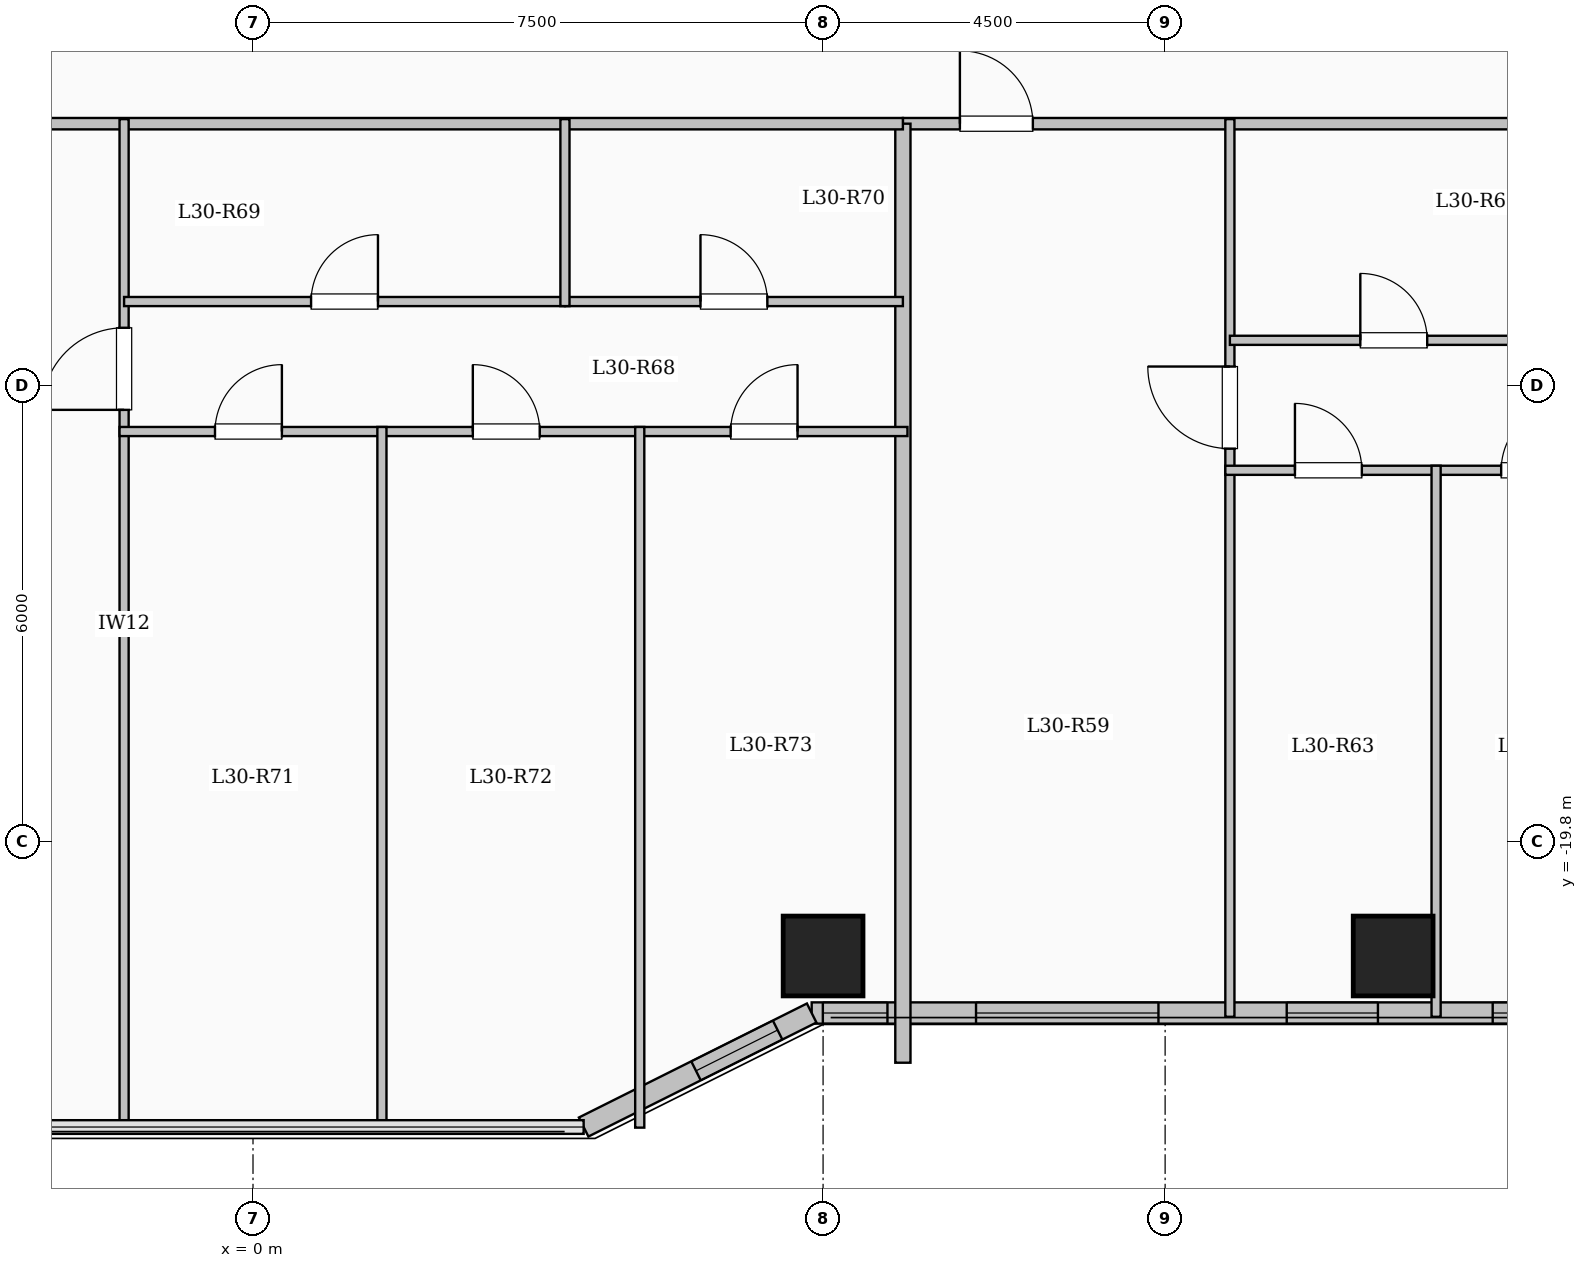
"""IFC4 building model, lengths in metres.
Left out: names, types, materials, properties, quantities, classifications, styles, units other than length and angle.
Written with IfcOpenShell. Run it as: python <this file> out.ifc"""

import sys

from ifc_helpers import new_model, si_unit, direction, frame, frame_2d, origin, origin_2d, place, context, subcontext, project, spatial, rectangle, extrude, element, fill, save


model = new_model("IFC4")
c1 = context("Model", 3, precision=1e-05, world=origin(), true_north=direction((0.0, 1.0)))
c2 = subcontext(c1, "Body", "Model", "MODEL_VIEW")
j1 = project(units=[si_unit("LENGTHUNIT", "METRE"), si_unit("PLANEANGLEUNIT", "RADIAN")], contexts=[c1])
p1 = place(None, origin())
s1 = spatial("IfcSite", under=j1, at=p1, CompositionType="ELEMENT")
p2 = place(p1, origin())
s2 = spatial("IfcBuilding", under=s1, at=p2, CompositionType="ELEMENT")
p3 = place(p2, frame((0.0, 0.0, 111.8)))
s3 = spatial("IfcBuildingStorey", under=s2, at=p3, CompositionType="ELEMENT", Elevation=111.8)
for number, where, z_axis, x_axis in (
    (1, (7.5, -21.3, 0.0), (0.0, 0.0, 1.0), (1.0, 0.0, 0.0)),
    (2, (15.0, -21.3, 0.0), (0.0, 0.0, 1.0), (1.0, 0.0, 0.0)),
):
    element("IfcColumn", number, at=place(p3, frame(where, z_axis=z_axis, x_axis=x_axis)), inside=s3, PredefinedType="COLUMN", context=c2, shape_type="SweptSolid", body=[
        extrude(rectangle(XDim=1.05, YDim=1.05, at=origin_2d()), origin(), (0.0, 0.0, 1.0), 3.35),
    ])
p4 = place(p3, frame((21.15, -22.05, 0.0), z_axis=(0.0, 0.0, 1.0), x_axis=(-1.0, 0.0, 0.0)))
e3 = element("IfcWall", 3, at=p4, inside=s3, PredefinedType="SOLIDWALL", context=c2, shape_type="SweptSolid", body=[
    extrude(rectangle(XDim=13.8, YDim=0.28, at=frame_2d((6.9, 0.0))), origin(), (0.0, 0.0, 1.0), 3.1),
])
p5 = place(p4, frame((0.88, 0.0, 0.95)))
e4 = element("IfcOpeningElement", 4, at=p5, cuts=e3, PredefinedType="OPENING", context=c2, shape_type="SweptSolid", body=[
    extrude(rectangle(XDim=1.2, YDim=1.5, at=frame_2d((0.6, 0.75))), frame((0.0, 0.15, 0.0), z_axis=(0.0, -1.0, 0.0), x_axis=(1.0, 0.0, 0.0)), (0.0, 0.0, 1.0), 0.3),
])
p6 = place(p4, frame((3.64, 0.0, 0.95)))
e5 = element("IfcOpeningElement", 5, at=p6, cuts=e3, PredefinedType="OPENING", context=c2, shape_type="SweptSolid", body=[
    extrude(rectangle(XDim=1.2, YDim=1.5, at=frame_2d((0.6, 0.75))), frame((0.0, 0.15, 0.0), z_axis=(0.0, -1.0, 0.0), x_axis=(1.0, 0.0, 0.0)), (0.0, 0.0, 1.0), 0.3),
])
p7 = place(p4, frame((6.35, 0.0, 0.95)))
e6 = element("IfcOpeningElement", 6, at=p7, cuts=e3, PredefinedType="OPENING", context=c2, shape_type="SweptSolid", body=[
    extrude(rectangle(XDim=1.2, YDim=1.5, at=frame_2d((0.6, 0.75))), frame((0.0, 0.15, 0.0), z_axis=(0.0, -1.0, 0.0), x_axis=(1.0, 0.0, 0.0)), (0.0, 0.0, 1.0), 0.3),
])
p8 = place(p4, frame((9.238, 0.0, 0.9)))
e7 = element("IfcOpeningElement", 7, at=p8, cuts=e3, PredefinedType="OPENING", context=c2, shape_type="SweptSolid", body=[
    extrude(rectangle(XDim=2.4, YDim=1.8, at=frame_2d((1.2, 0.9))), frame((0.0, 0.15, 0.0), z_axis=(0.0, -1.0, 0.0), x_axis=(1.0, 0.0, 0.0)), (0.0, 0.0, 1.0), 0.3),
])
p9 = place(p4, frame((12.803, 0.0, 0.95)))
e8 = element("IfcOpeningElement", 8, at=p9, cuts=e3, PredefinedType="OPENING", context=c2, shape_type="SweptSolid", body=[
    extrude(rectangle(XDim=0.85, YDim=1.5, at=frame_2d((0.425, 0.75))), frame((0.0, 0.15, 0.0), z_axis=(0.0, -1.0, 0.0), x_axis=(1.0, 0.0, 0.0)), (0.0, 0.0, 1.0), 0.3),
])
p10 = place(p3, frame((7.35, -22.05, 0.0), z_axis=(0.0, 0.0, 1.0), x_axis=(-0.894427191, -0.4472135955, 0.0)))
e9 = element("IfcWall", 9, at=p10, inside=s3, PredefinedType="SOLIDWALL", context=c2, shape_type="SweptSolid", body=[
    extrude(rectangle(XDim=3.354, YDim=0.28, at=frame_2d((1.677, 0.0))), origin(), (0.0, 0.0, 1.0), 3.1),
])
p11 = place(p10, frame((0.501, 0.0, 0.95)))
e10 = element("IfcOpeningElement", 10, at=p11, cuts=e9, PredefinedType="OPENING", context=c2, shape_type="SweptSolid", body=[
    extrude(rectangle(XDim=1.2, YDim=1.5, at=frame_2d((0.6, 0.75))), frame((0.0, 0.15, 0.0), z_axis=(0.0, -1.0, 0.0), x_axis=(1.0, 0.0, 0.0)), (0.0, 0.0, 1.0), 0.3),
])
p12 = place(p3, frame((8.55, -10.35, 0.0), z_axis=(0.0, 0.0, 1.0), x_axis=(1.0, 0.0, 0.0)))
e11 = element("IfcWall", 11, at=p12, inside=s3, PredefinedType="PARTITIONING", context=c2, shape_type="SweptSolid", body=[
    extrude(rectangle(XDim=12.5, YDim=0.15, at=frame_2d((6.25, 0.0))), origin(), (0.0, 0.0, 1.0), 3.1),
])
p13 = place(p12, frame((0.75, 0.0, 0.0)))
e12 = element("IfcOpeningElement", 12, at=p13, cuts=e11, PredefinedType="OPENING", context=c2, shape_type="SweptSolid", body=[
    extrude(rectangle(XDim=0.96, YDim=2.15, at=frame_2d((0.48, 1.075))), frame((0.0, 0.085, 0.0), z_axis=(0.0, -1.0, 0.0), x_axis=(1.0, 0.0, 0.0)), (0.0, 0.0, 1.0), 0.17),
])
p14 = place(p3, frame((12.852, -22.1, 0.0), z_axis=(0.0, 0.0, 1.0), x_axis=(0.0, 1.0, 0.0)))
e13 = element("IfcWall", 13, at=p14, inside=s3, PredefinedType="PARTITIONING", context=c2, shape_type="SweptSolid", body=[
    extrude(rectangle(XDim=11.81, YDim=0.12, at=frame_2d((5.905, 0.0))), origin(), (0.0, 0.0, 1.0), 3.1),
])
p15 = place(p14, frame((7.475, 0.0, 0.0)))
e14 = element("IfcOpeningElement", 14, at=p15, cuts=e13, PredefinedType="OPENING", context=c2, shape_type="SweptSolid", body=[
    extrude(rectangle(XDim=1.08, YDim=2.15, at=frame_2d((0.54, 1.075))), frame((0.0, 0.07, 0.0), z_axis=(0.0, -1.0, 0.0), x_axis=(1.0, 0.0, 0.0)), (0.0, 0.0, 1.0), 0.14),
])
p16 = place(p3, frame((12.852, -13.2, 0.0), z_axis=(0.0, 0.0, 1.0), x_axis=(1.0, 0.0, 0.0)))
e15 = element("IfcWall", 15, at=p16, inside=s3, PredefinedType="PARTITIONING", context=c2, shape_type="SweptSolid", body=[
    extrude(rectangle(XDim=4.313, YDim=0.12, at=frame_2d((2.156, 0.0))), origin(), (0.0, 0.0, 1.0), 3.1),
])
p17 = place(p16, frame((1.716, 0.0, 0.0)))
e16 = element("IfcOpeningElement", 16, at=p17, cuts=e15, PredefinedType="OPENING", context=c2, shape_type="SweptSolid", body=[
    extrude(rectangle(XDim=0.88, YDim=2.1, at=frame_2d((0.44, 1.05))), frame((0.0, 0.07, 0.0), z_axis=(0.0, -1.0, 0.0), x_axis=(1.0, 0.0, 0.0)), (0.0, 0.0, 1.0), 0.14),
])
p18 = place(p3, frame((12.792, -14.91, 0.0), z_axis=(0.0, 0.0, 1.0), x_axis=(1.0, 0.0, 0.0)))
e17 = element("IfcWall", 17, at=p18, inside=s3, PredefinedType="PARTITIONING", context=c2, shape_type="SweptSolid", body=[
    extrude(rectangle(XDim=8.318, YDim=0.12, at=frame_2d((4.159, 0.0))), origin(), (0.0, 0.0, 1.0), 3.1),
])
p19 = place(p18, frame((0.916, 0.0, 0.0)))
e18 = element("IfcOpeningElement", 18, at=p19, cuts=e17, PredefinedType="OPENING", context=c2, shape_type="SweptSolid", body=[
    extrude(rectangle(XDim=0.88, YDim=2.1, at=frame_2d((0.44, 1.05))), frame((0.0, 0.07, 0.0), z_axis=(0.0, -1.0, 0.0), x_axis=(1.0, 0.0, 0.0)), (0.0, 0.0, 1.0), 0.14),
])
p20 = place(p18, frame((3.629, 0.0, 0.0)))
e19 = element("IfcOpeningElement", 19, at=p20, cuts=e17, PredefinedType="OPENING", context=c2, shape_type="SweptSolid", body=[
    extrude(rectangle(XDim=0.88, YDim=2.1, at=frame_2d((0.44, 1.05))), frame((0.0, 0.07, 0.0), z_axis=(0.0, -1.0, 0.0), x_axis=(1.0, 0.0, 0.0)), (0.0, 0.0, 1.0), 0.14),
])
p21 = place(p18, frame((6.342, 0.0, 0.0)))
e20 = element("IfcOpeningElement", 20, at=p21, cuts=e17, PredefinedType="OPENING", context=c2, shape_type="SweptSolid", body=[
    extrude(rectangle(XDim=0.88, YDim=2.1, at=frame_2d((0.44, 1.05))), frame((0.0, 0.07, 0.0), z_axis=(0.0, -1.0, 0.0), x_axis=(1.0, 0.0, 0.0)), (0.0, 0.0, 1.0), 0.14),
])
p22 = place(p3, frame((15.565, -22.1, 0.0), z_axis=(0.0, 0.0, 1.0), x_axis=(0.0, 1.0, 0.0)))
e21 = element("IfcWall", 21, at=p22, inside=s3, PredefinedType="PARTITIONING", context=c2, shape_type="SweptSolid", body=[
    extrude(rectangle(XDim=7.25, YDim=0.12, at=frame_2d((3.625, 0.0))), origin(), (0.0, 0.0, 1.0), 3.1),
])
p23 = place(p3, frame((8.55, -22.704, 0.0), z_axis=(0.0, 0.0, 1.0), x_axis=(0.0, 1.0, 0.0)))
e22 = element("IfcWall", 22, at=p23, inside=s3, PredefinedType="SOLIDWALL", context=c2, shape_type="SweptSolid", body=[
    extrude(rectangle(XDim=12.354, YDim=0.2, at=frame_2d((6.177, 0.0))), origin(), (0.0, 0.0, 1.0), 3.1),
])
p24 = place(p3, frame((-8.55, -10.35, 0.0), z_axis=(0.0, 0.0, 1.0), x_axis=(1.0, 0.0, 0.0)))
e23 = element("IfcWall", 23, at=p24, inside=s3, PredefinedType="PARTITIONING", context=c2, shape_type="SweptSolid", body=[
    extrude(rectangle(XDim=17.1, YDim=0.15, at=frame_2d((8.55, 0.0))), origin(), (0.0, 0.0, 1.0), 3.1),
])
p25 = place(p24, frame((1.6, 0.0, 0.0)))
e24 = element("IfcOpeningElement", 24, at=p25, cuts=e23, PredefinedType="OPENING", context=c2, shape_type="SweptSolid", body=[
    extrude(rectangle(XDim=0.96, YDim=2.15, at=frame_2d((0.48, 1.075))), frame((0.0, 0.085, 0.0), z_axis=(0.0, -1.0, 0.0), x_axis=(1.0, 0.0, 0.0)), (0.0, 0.0, 1.0), 0.17),
])
p26 = place(p3, frame((-1.696, -23.58, 0.0), z_axis=(0.0, 0.0, 1.0), x_axis=(0.0, 1.0, 0.0)))
e25 = element("IfcWall", 25, at=p26, inside=s3, PredefinedType="PARTITIONING", context=c2, shape_type="SweptSolid", body=[
    extrude(rectangle(XDim=13.29, YDim=0.12, at=frame_2d((6.645, 0.0))), origin(), (0.0, 0.0, 1.0), 3.1),
])
p27 = place(p26, frame((9.465, 0.0, 0.0)))
e26 = element("IfcOpeningElement", 26, at=p27, cuts=e25, PredefinedType="OPENING", context=c2, shape_type="SweptSolid", body=[
    extrude(rectangle(XDim=1.08, YDim=2.15, at=frame_2d((0.54, 1.075))), frame((0.0, 0.07, 0.0), z_axis=(0.0, -1.0, 0.0), x_axis=(1.0, 0.0, 0.0)), (0.0, 0.0, 1.0), 0.14),
])
p28 = place(p3, frame((-1.696, -12.69, 0.0), z_axis=(0.0, 0.0, 1.0), x_axis=(1.0, 0.0, 0.0)))
e27 = element("IfcWall", 27, at=p28, inside=s3, PredefinedType="PARTITIONING", context=c2, shape_type="SweptSolid", body=[
    extrude(rectangle(XDim=5.8, YDim=0.12, at=frame_2d((2.9, 0.0))), origin(), (0.0, 0.0, 1.0), 2.635),
])
p29 = place(p28, frame((2.46, 0.0, 0.0)))
e28 = element("IfcOpeningElement", 28, at=p29, cuts=e27, PredefinedType="OPENING", context=c2, shape_type="SweptSolid", body=[
    extrude(rectangle(XDim=0.88, YDim=2.1, at=frame_2d((0.44, 1.05))), frame((0.0, 0.07, 0.0), z_axis=(0.0, -1.0, 0.0), x_axis=(1.0, 0.0, 0.0)), (0.0, 0.0, 1.0), 0.14),
])
p30 = place(p3, frame((4.104, -12.69, 0.0), z_axis=(0.0, 0.0, 1.0), x_axis=(1.0, 0.0, 0.0)))
e29 = element("IfcWall", 29, at=p30, inside=s3, PredefinedType="PARTITIONING", context=c2, shape_type="SweptSolid", body=[
    extrude(rectangle(XDim=4.446, YDim=0.12, at=frame_2d((2.223, 0.0))), origin(), (0.0, 0.0, 1.0), 2.635),
])
p31 = place(p30, frame((1.783, 0.0, 0.0)))
e30 = element("IfcOpeningElement", 30, at=p31, cuts=e29, PredefinedType="OPENING", context=c2, shape_type="SweptSolid", body=[
    extrude(rectangle(XDim=0.88, YDim=2.1, at=frame_2d((0.44, 1.05))), frame((0.0, 0.07, 0.0), z_axis=(0.0, -1.0, 0.0), x_axis=(1.0, 0.0, 0.0)), (0.0, 0.0, 1.0), 0.14),
])
p32 = place(p3, frame((-1.756, -14.4, 0.0), z_axis=(0.0, 0.0, 1.0), x_axis=(1.0, 0.0, 0.0)))
e31 = element("IfcWall", 31, at=p32, inside=s3, PredefinedType="PARTITIONING", context=c2, shape_type="SweptSolid", body=[
    extrude(rectangle(XDim=10.366, YDim=0.12, at=frame_2d((5.183, 0.0))), origin(), (0.0, 0.0, 1.0), 2.635),
])
p33 = place(p32, frame((1.256, 0.0, 0.0)))
e32 = element("IfcOpeningElement", 32, at=p33, cuts=e31, PredefinedType="OPENING", context=c2, shape_type="SweptSolid", body=[
    extrude(rectangle(XDim=0.88, YDim=2.1, at=frame_2d((0.44, 1.05))), frame((0.0, 0.07, 0.0), z_axis=(0.0, -1.0, 0.0), x_axis=(1.0, 0.0, 0.0)), (0.0, 0.0, 1.0), 0.14),
])
p34 = place(p32, frame((4.648, 0.0, 0.0)))
e33 = element("IfcOpeningElement", 33, at=p34, cuts=e31, PredefinedType="OPENING", context=c2, shape_type="SweptSolid", body=[
    extrude(rectangle(XDim=0.88, YDim=2.1, at=frame_2d((0.44, 1.05))), frame((0.0, 0.07, 0.0), z_axis=(0.0, -1.0, 0.0), x_axis=(1.0, 0.0, 0.0)), (0.0, 0.0, 1.0), 0.14),
])
p35 = place(p32, frame((8.04, 0.0, 0.0)))
e34 = element("IfcOpeningElement", 34, at=p35, cuts=e31, PredefinedType="OPENING", context=c2, shape_type="SweptSolid", body=[
    extrude(rectangle(XDim=0.88, YDim=2.1, at=frame_2d((0.44, 1.05))), frame((0.0, 0.07, 0.0), z_axis=(0.0, -1.0, 0.0), x_axis=(1.0, 0.0, 0.0)), (0.0, 0.0, 1.0), 0.14),
])
p36 = place(p3, frame((4.104, -12.75, 0.0), z_axis=(0.0, 0.0, 1.0), x_axis=(0.0, 1.0, 0.0)))
e35 = element("IfcWall", 35, at=p36, inside=s3, PredefinedType="PARTITIONING", context=c2, shape_type="SweptSolid", body=[
    extrude(rectangle(XDim=2.46, YDim=0.12, at=frame_2d((1.23, 0.0))), origin(), (0.0, 0.0, 1.0), 3.1),
])
p37 = place(p3, frame((1.696, -23.58, 0.0), z_axis=(0.0, 0.0, 1.0), x_axis=(0.0, 1.0, 0.0)))
e36 = element("IfcWall", 36, at=p37, inside=s3, PredefinedType="PARTITIONING", context=c2, shape_type="SweptSolid", body=[
    extrude(rectangle(XDim=9.24, YDim=0.12, at=frame_2d((4.62, 0.0))), origin(), (0.0, 0.0, 1.0), 3.1),
])
p38 = place(p3, frame((5.088, -23.558, 0.0), z_axis=(0.0, 0.0, 1.0), x_axis=(0.0, 1.0, 0.0)))
e37 = element("IfcWall", 37, at=p38, inside=s3, PredefinedType="PARTITIONING", context=c2, shape_type="SweptSolid", body=[
    extrude(rectangle(XDim=9.218, YDim=0.12, at=frame_2d((4.609, 0.0))), origin(), (0.0, 0.0, 1.0), 3.1),
])
p39 = place(p6, origin())
e38 = element("IfcWindow", 38, at=p39, inside=s3, PartitioningType="SINGLE_PANEL", PredefinedType="WINDOW", context=c2, shape_type="SweptSolid", body=[
    extrude(rectangle(XDim=1.2, YDim=1.5, at=frame_2d((0.6, 0.75))), frame((0.0, 0.03, 0.0), z_axis=(0.0, -1.0, 0.0), x_axis=(1.0, 0.0, 0.0)), (0.0, 0.0, 1.0), 0.06),
])
fill(e5, e38)
p40 = place(p7, origin())
e39 = element("IfcWindow", 39, at=p40, inside=s3, PartitioningType="SINGLE_PANEL", PredefinedType="WINDOW", context=c2, shape_type="SweptSolid", body=[
    extrude(rectangle(XDim=1.2, YDim=1.5, at=frame_2d((0.6, 0.75))), frame((0.0, 0.03, 0.0), z_axis=(0.0, -1.0, 0.0), x_axis=(1.0, 0.0, 0.0)), (0.0, 0.0, 1.0), 0.06),
])
fill(e6, e39)
p41 = place(p8, origin())
e40 = element("IfcWindow", 40, at=p41, inside=s3, PartitioningType="SINGLE_PANEL", PredefinedType="WINDOW", context=c2, shape_type="SweptSolid", body=[
    extrude(rectangle(XDim=2.4, YDim=1.8, at=frame_2d((1.2, 0.9))), frame((0.0, 0.03, 0.0), z_axis=(0.0, -1.0, 0.0), x_axis=(1.0, 0.0, 0.0)), (0.0, 0.0, 1.0), 0.06),
])
fill(e7, e40)
p42 = place(p9, origin())
e41 = element("IfcWindow", 41, at=p42, inside=s3, PartitioningType="SINGLE_PANEL", PredefinedType="WINDOW", context=c2, shape_type="SweptSolid", body=[
    extrude(rectangle(XDim=0.85, YDim=1.5, at=frame_2d((0.425, 0.75))), frame((0.0, 0.03, 0.0), z_axis=(0.0, -1.0, 0.0), x_axis=(1.0, 0.0, 0.0)), (0.0, 0.0, 1.0), 0.06),
])
fill(e8, e41)
p43 = place(p11, origin())
e42 = element("IfcWindow", 42, at=p43, inside=s3, PartitioningType="SINGLE_PANEL", PredefinedType="WINDOW", context=c2, shape_type="SweptSolid", body=[
    extrude(rectangle(XDim=1.2, YDim=1.5, at=frame_2d((0.6, 0.75))), frame((0.0, 0.03, 0.0), z_axis=(0.0, -1.0, 0.0), x_axis=(1.0, 0.0, 0.0)), (0.0, 0.0, 1.0), 0.06),
])
fill(e10, e42)
p44 = place(p13, origin())
e43 = element("IfcDoor", 43, at=p44, inside=s3, OperationType="SINGLE_SWING_LEFT", PredefinedType="DOOR", context=c2, shape_type="SweptSolid", body=[
    extrude(rectangle(XDim=0.96, YDim=2.15, at=frame_2d((0.48, 1.075))), frame((0.0, 0.025, 0.0), z_axis=(0.0, -1.0, 0.0), x_axis=(1.0, 0.0, 0.0)), (0.0, 0.0, 1.0), 0.05),
])
fill(e12, e43)
p45 = place(p15, origin())
e44 = element("IfcDoor", 44, at=p45, inside=s3, OperationType="SINGLE_SWING_RIGHT", PredefinedType="DOOR", context=c2, shape_type="SweptSolid", body=[
    extrude(rectangle(XDim=1.08, YDim=2.15, at=frame_2d((0.54, 1.075))), frame((0.0, 0.025, 0.0), z_axis=(0.0, -1.0, 0.0), x_axis=(1.0, 0.0, 0.0)), (0.0, 0.0, 1.0), 0.05),
])
fill(e14, e44)
p46 = place(p17, origin())
e45 = element("IfcDoor", 45, at=p46, inside=s3, OperationType="SINGLE_SWING_LEFT", PredefinedType="DOOR", context=c2, shape_type="SweptSolid", body=[
    extrude(rectangle(XDim=0.88, YDim=2.1, at=frame_2d((0.44, 1.05))), frame((0.0, 0.025, 0.0), z_axis=(0.0, -1.0, 0.0), x_axis=(1.0, 0.0, 0.0)), (0.0, 0.0, 1.0), 0.05),
])
fill(e16, e45)
p47 = place(p19, origin())
e46 = element("IfcDoor", 46, at=p47, inside=s3, OperationType="SINGLE_SWING_LEFT", PredefinedType="DOOR", context=c2, shape_type="SweptSolid", body=[
    extrude(rectangle(XDim=0.88, YDim=2.1, at=frame_2d((0.44, 1.05))), frame((0.0, 0.025, 0.0), z_axis=(0.0, -1.0, 0.0), x_axis=(1.0, 0.0, 0.0)), (0.0, 0.0, 1.0), 0.05),
])
fill(e18, e46)
p48 = place(p20, origin())
e47 = element("IfcDoor", 47, at=p48, inside=s3, OperationType="SINGLE_SWING_RIGHT", PredefinedType="DOOR", context=c2, shape_type="SweptSolid", body=[
    extrude(rectangle(XDim=0.88, YDim=2.1, at=frame_2d((0.44, 1.05))), frame((0.0, 0.025, 0.0), z_axis=(0.0, -1.0, 0.0), x_axis=(1.0, 0.0, 0.0)), (0.0, 0.0, 1.0), 0.05),
])
fill(e19, e47)
p49 = place(p27, origin())
e48 = element("IfcDoor", 48, at=p49, inside=s3, OperationType="SINGLE_SWING_LEFT", PredefinedType="DOOR", context=c2, shape_type="SweptSolid", body=[
    extrude(rectangle(XDim=1.08, YDim=2.15, at=frame_2d((0.54, 1.075))), frame((0.0, 0.025, 0.0), z_axis=(0.0, -1.0, 0.0), x_axis=(1.0, 0.0, 0.0)), (0.0, 0.0, 1.0), 0.05),
])
fill(e26, e48)
p50 = place(p29, origin())
e49 = element("IfcDoor", 49, at=p50, inside=s3, OperationType="SINGLE_SWING_RIGHT", PredefinedType="DOOR", context=c2, shape_type="SweptSolid", body=[
    extrude(rectangle(XDim=0.88, YDim=2.1, at=frame_2d((0.44, 1.05))), frame((0.0, 0.025, 0.0), z_axis=(0.0, -1.0, 0.0), x_axis=(1.0, 0.0, 0.0)), (0.0, 0.0, 1.0), 0.05),
])
fill(e28, e49)
p51 = place(p31, origin())
e50 = element("IfcDoor", 50, at=p51, inside=s3, OperationType="SINGLE_SWING_LEFT", PredefinedType="DOOR", context=c2, shape_type="SweptSolid", body=[
    extrude(rectangle(XDim=0.88, YDim=2.1, at=frame_2d((0.44, 1.05))), frame((0.0, 0.025, 0.0), z_axis=(0.0, -1.0, 0.0), x_axis=(1.0, 0.0, 0.0)), (0.0, 0.0, 1.0), 0.05),
])
fill(e30, e50)
p52 = place(p33, origin())
e51 = element("IfcDoor", 51, at=p52, inside=s3, OperationType="SINGLE_SWING_RIGHT", PredefinedType="DOOR", context=c2, shape_type="SweptSolid", body=[
    extrude(rectangle(XDim=0.88, YDim=2.1, at=frame_2d((0.44, 1.05))), frame((0.0, 0.025, 0.0), z_axis=(0.0, -1.0, 0.0), x_axis=(1.0, 0.0, 0.0)), (0.0, 0.0, 1.0), 0.05),
])
fill(e32, e51)
p53 = place(p34, origin())
e52 = element("IfcDoor", 52, at=p53, inside=s3, OperationType="SINGLE_SWING_LEFT", PredefinedType="DOOR", context=c2, shape_type="SweptSolid", body=[
    extrude(rectangle(XDim=0.88, YDim=2.1, at=frame_2d((0.44, 1.05))), frame((0.0, 0.025, 0.0), z_axis=(0.0, -1.0, 0.0), x_axis=(1.0, 0.0, 0.0)), (0.0, 0.0, 1.0), 0.05),
])
fill(e33, e52)
p54 = place(p35, origin())
e53 = element("IfcDoor", 53, at=p54, inside=s3, OperationType="SINGLE_SWING_RIGHT", PredefinedType="DOOR", context=c2, shape_type="SweptSolid", body=[
    extrude(rectangle(XDim=0.88, YDim=2.1, at=frame_2d((0.44, 1.05))), frame((0.0, 0.025, 0.0), z_axis=(0.0, -1.0, 0.0), x_axis=(1.0, 0.0, 0.0)), (0.0, 0.0, 1.0), 0.05),
])
fill(e34, e53)
save(model, sys.argv[1])
